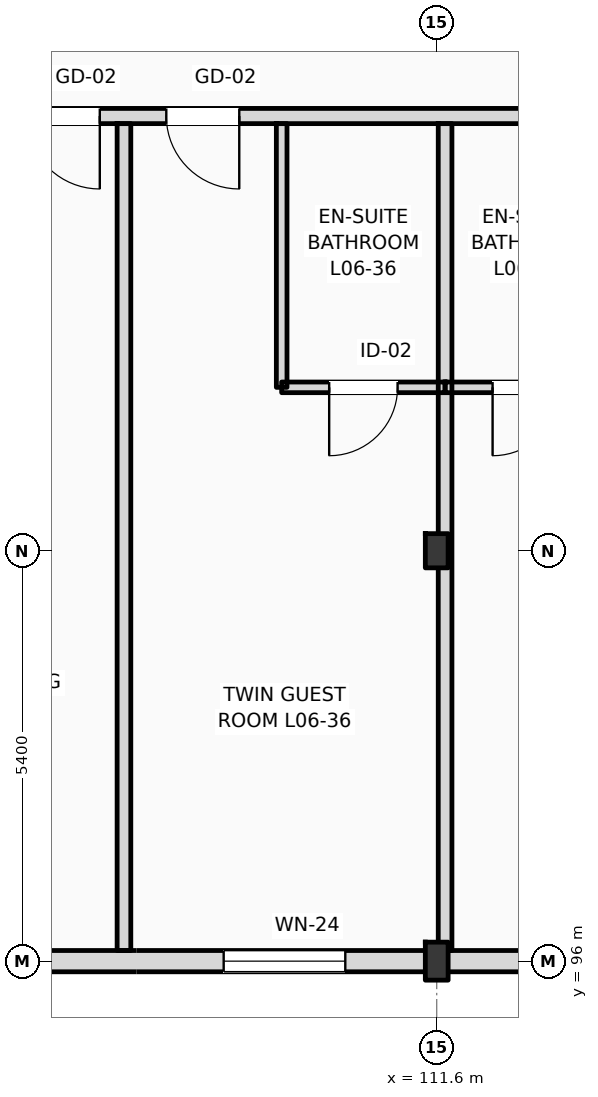
"""IFC4 building model, lengths in metres.
Left out: names, types, materials, properties, quantities, classifications, styles, units other than length and angle.
Written with IfcOpenShell. Run it as: python <this file> out.ifc"""

import sys

from ifc_helpers import new_model, si_unit, direction, frame, frame_2d, origin, origin_2d, place, context, subcontext, project, spatial, rectangle, i_section, extrude, element, fill, save


model = new_model("IFC4")
c1 = context("Model", 3, precision=1e-05, world=origin(), true_north=direction((0.0, 1.0)))
c2 = subcontext(c1, "Body", "Model", "MODEL_VIEW")
j1 = project(units=[si_unit("LENGTHUNIT", "METRE"), si_unit("PLANEANGLEUNIT", "RADIAN")], contexts=[c1])
p1 = place(None, origin())
s1 = spatial("IfcSite", under=j1, at=p1, CompositionType="ELEMENT")
p2 = place(p1, origin())
s2 = spatial("IfcBuilding", under=s1, at=p2, CompositionType="ELEMENT")
p3 = place(p2, frame((0.0, 0.0, 28.2)))
s3 = spatial("IfcBuildingStorey", under=s2, at=p3, CompositionType="ELEMENT", Elevation=28.2)
p4 = place(p3, frame((111.6, 96.0, 0.0), z_axis=(0.0, 0.0, 1.0), x_axis=(1.0, 0.0, 0.0)))
e1 = element("IfcColumn", 1, at=p4, inside=s3, PredefinedType="COLUMN", context=c2, shape_type="SweptSolid", body=[
    extrude(i_section(OverallWidth=0.3, OverallDepth=0.5, WebThickness=0.014, FlangeThickness=0.028, FilletRadius=0.027, at=origin_2d()), origin(), (0.0, 0.0, 1.0), 3.6),
])
p5 = place(p3, frame((111.6, 101.4, 0.0), z_axis=(0.0, 0.0, 1.0), x_axis=(1.0, 0.0, 0.0)))
e2 = element("IfcColumn", 2, at=p5, inside=s3, PredefinedType="COLUMN", context=c2, shape_type="SweptSolid", body=[
    extrude(i_section(OverallWidth=0.3, OverallDepth=0.45, WebThickness=0.014, FlangeThickness=0.026, FilletRadius=0.027, at=origin_2d()), origin(), (0.0, 0.0, 1.0), 3.6),
])
p6 = place(p3, frame((25.2, 96.0, 0.0), z_axis=(0.0, 0.0, 1.0), x_axis=(1.0, 0.0, 0.0)))
e3 = element("IfcWall", 3, at=p6, inside=s3, PredefinedType="STANDARD", context=c2, shape_type="SweptSolid", body=[
    extrude(rectangle(XDim=94.8, YDim=0.28, at=frame_2d((47.4, 0.0))), origin(), (0.0, 0.0, 1.0), 2.8),
])
p7 = place(p6, frame((16.454, 0.0, 0.9)))
e4 = element("IfcOpeningElement", 4, at=p7, cuts=e3, PredefinedType="OPENING", context=c2, shape_type="SweptSolid", body=[
    extrude(rectangle(XDim=2.7, YDim=1.72, at=frame_2d((1.35, 0.86))), frame((0.0, 0.15, 0.0), z_axis=(0.0, -1.0, 0.0), x_axis=(1.0, 0.0, 0.0)), (0.0, 0.0, 1.0), 0.3),
])
p8 = place(p6, frame((20.068, 0.0, 0.9)))
e5 = element("IfcOpeningElement", 5, at=p8, cuts=e3, PredefinedType="OPENING", context=c2, shape_type="SweptSolid", body=[
    extrude(rectangle(XDim=2.389, YDim=1.72, at=frame_2d((1.194, 0.86))), frame((0.0, 0.15, 0.0), z_axis=(0.0, -1.0, 0.0), x_axis=(1.0, 0.0, 0.0)), (0.0, 0.0, 1.0), 0.3),
])
p9 = place(p6, frame((24.277, 0.0, 0.9)))
e6 = element("IfcOpeningElement", 6, at=p9, cuts=e3, PredefinedType="OPENING", context=c2, shape_type="SweptSolid", body=[
    extrude(rectangle(XDim=1.8, YDim=1.72, at=frame_2d((0.9, 0.86))), frame((0.0, 0.15, 0.0), z_axis=(0.0, -1.0, 0.0), x_axis=(1.0, 0.0, 0.0)), (0.0, 0.0, 1.0), 0.3),
])
p10 = place(p6, frame((27.885, 0.0, 0.9)))
e7 = element("IfcOpeningElement", 7, at=p10, cuts=e3, PredefinedType="OPENING", context=c2, shape_type="SweptSolid", body=[
    extrude(rectangle(XDim=2.388, YDim=1.72, at=frame_2d((1.194, 0.86))), frame((0.0, 0.15, 0.0), z_axis=(0.0, -1.0, 0.0), x_axis=(1.0, 0.0, 0.0)), (0.0, 0.0, 1.0), 0.3),
])
p11 = place(p6, frame((32.093, 0.0, 0.9)))
e8 = element("IfcOpeningElement", 8, at=p11, cuts=e3, PredefinedType="OPENING", context=c2, shape_type="SweptSolid", body=[
    extrude(rectangle(XDim=1.8, YDim=1.72, at=frame_2d((0.9, 0.86))), frame((0.0, 0.15, 0.0), z_axis=(0.0, -1.0, 0.0), x_axis=(1.0, 0.0, 0.0)), (0.0, 0.0, 1.0), 0.3),
])
p12 = place(p6, frame((35.702, 0.0, 0.9)))
e9 = element("IfcOpeningElement", 9, at=p12, cuts=e3, PredefinedType="OPENING", context=c2, shape_type="SweptSolid", body=[
    extrude(rectangle(XDim=2.488, YDim=1.72, at=frame_2d((1.244, 0.86))), frame((0.0, 0.15, 0.0), z_axis=(0.0, -1.0, 0.0), x_axis=(1.0, 0.0, 0.0)), (0.0, 0.0, 1.0), 0.3),
])
p13 = place(p6, frame((55.56, 0.0, 0.9)))
e10 = element("IfcOpeningElement", 10, at=p13, cuts=e3, PredefinedType="OPENING", context=c2, shape_type="SweptSolid", body=[
    extrude(rectangle(XDim=1.8, YDim=1.72, at=frame_2d((0.9, 0.86))), frame((0.0, 0.15, 0.0), z_axis=(0.0, -1.0, 0.0), x_axis=(1.0, 0.0, 0.0)), (0.0, 0.0, 1.0), 0.3),
])
p14 = place(p6, frame((58.985, 0.0, 0.9)))
e11 = element("IfcOpeningElement", 11, at=p14, cuts=e3, PredefinedType="OPENING", context=c2, shape_type="SweptSolid", body=[
    extrude(rectangle(XDim=1.8, YDim=1.72, at=frame_2d((0.9, 0.86))), frame((0.0, 0.15, 0.0), z_axis=(0.0, -1.0, 0.0), x_axis=(1.0, 0.0, 0.0)), (0.0, 0.0, 1.0), 0.3),
])
p15 = place(p6, frame((63.21, 0.0, 0.9)))
e12 = element("IfcOpeningElement", 12, at=p15, cuts=e3, PredefinedType="OPENING", context=c2, shape_type="SweptSolid", body=[
    extrude(rectangle(XDim=2.525, YDim=1.72, at=frame_2d((1.262, 0.86))), frame((0.0, 0.15, 0.0), z_axis=(0.0, -1.0, 0.0), x_axis=(1.0, 0.0, 0.0)), (0.0, 0.0, 1.0), 0.3),
])
p16 = place(p6, frame((66.955, 0.0, 0.9)))
e13 = element("IfcOpeningElement", 13, at=p16, cuts=e3, PredefinedType="OPENING", context=c2, shape_type="SweptSolid", body=[
    extrude(rectangle(XDim=1.8, YDim=1.72, at=frame_2d((0.9, 0.86))), frame((0.0, 0.15, 0.0), z_axis=(0.0, -1.0, 0.0), x_axis=(1.0, 0.0, 0.0)), (0.0, 0.0, 1.0), 0.3),
])
p17 = place(p6, frame((71.892, 0.0, 0.9)))
e14 = element("IfcOpeningElement", 14, at=p17, cuts=e3, PredefinedType="OPENING", context=c2, shape_type="SweptSolid", body=[
    extrude(rectangle(XDim=1.1, YDim=1.5, at=frame_2d((0.55, 0.75))), frame((0.0, 0.15, 0.0), z_axis=(0.0, -1.0, 0.0), x_axis=(1.0, 0.0, 0.0)), (0.0, 0.0, 1.0), 0.3),
])
p18 = place(p6, frame((75.802, 0.0, 0.9)))
e15 = element("IfcOpeningElement", 15, at=p18, cuts=e3, PredefinedType="OPENING", context=c2, shape_type="SweptSolid", body=[
    extrude(rectangle(XDim=1.25, YDim=1.6, at=frame_2d((0.625, 0.8))), frame((0.0, 0.15, 0.0), z_axis=(0.0, -1.0, 0.0), x_axis=(1.0, 0.0, 0.0)), (0.0, 0.0, 1.0), 0.3),
])
p19 = place(p6, frame((79.712, 0.0, 0.9)))
e16 = element("IfcOpeningElement", 16, at=p19, cuts=e3, PredefinedType="OPENING", context=c2, shape_type="SweptSolid", body=[
    extrude(rectangle(XDim=1.4, YDim=1.7, at=frame_2d((0.7, 0.85))), frame((0.0, 0.15, 0.0), z_axis=(0.0, -1.0, 0.0), x_axis=(1.0, 0.0, 0.0)), (0.0, 0.0, 1.0), 0.3),
])
p20 = place(p6, frame((83.597, 0.0, 0.9)))
e17 = element("IfcOpeningElement", 17, at=p20, cuts=e3, PredefinedType="OPENING", context=c2, shape_type="SweptSolid", body=[
    extrude(rectangle(XDim=1.6, YDim=1.72, at=frame_2d((0.8, 0.86))), frame((0.0, 0.15, 0.0), z_axis=(0.0, -1.0, 0.0), x_axis=(1.0, 0.0, 0.0)), (0.0, 0.0, 1.0), 0.3),
])
p21 = place(p6, frame((87.507, 0.0, 0.9)))
e18 = element("IfcOpeningElement", 18, at=p21, cuts=e3, PredefinedType="OPENING", context=c2, shape_type="SweptSolid", body=[
    extrude(rectangle(XDim=1.75, YDim=1.72, at=frame_2d((0.875, 0.86))), frame((0.0, 0.15, 0.0), z_axis=(0.0, -1.0, 0.0), x_axis=(1.0, 0.0, 0.0)), (0.0, 0.0, 1.0), 0.3),
])
p22 = place(p6, frame((91.328, 0.0, 0.9)))
e19 = element("IfcOpeningElement", 19, at=p22, cuts=e3, PredefinedType="OPENING", context=c2, shape_type="SweptSolid", body=[
    extrude(rectangle(XDim=2.0, YDim=1.72, at=frame_2d((1.0, 0.86))), frame((0.0, 0.15, 0.0), z_axis=(0.0, -1.0, 0.0), x_axis=(1.0, 0.0, 0.0)), (0.0, 0.0, 1.0), 0.3),
])
p23 = place(p3, frame((79.76, 107.12, 0.0), z_axis=(0.0, 0.0, 1.0), x_axis=(1.0, 0.0, 0.0)))
e20 = element("IfcWall", 20, at=p23, inside=s3, PredefinedType="PARTITIONING", context=c2, shape_type="SweptSolid", body=[
    extrude(rectangle(XDim=40.1, YDim=0.2, at=frame_2d((20.05, 0.0))), origin(), (0.0, 0.0, 1.0), 3.36),
])
p24 = place(p23, frame((2.497, 0.0, 0.0)))
e21 = element("IfcOpeningElement", 21, at=p24, cuts=e20, PredefinedType="OPENING", context=c2, shape_type="SweptSolid", body=[
    extrude(rectangle(XDim=0.96, YDim=2.2, at=frame_2d((0.48, 1.1))), frame((0.0, 0.11, 0.0), z_axis=(0.0, -1.0, 0.0), x_axis=(1.0, 0.0, 0.0)), (0.0, 0.0, 1.0), 0.22),
])
p25 = place(p23, frame((4.372, 0.0, 0.0)))
e22 = element("IfcOpeningElement", 22, at=p25, cuts=e20, PredefinedType="OPENING", context=c2, shape_type="SweptSolid", body=[
    extrude(rectangle(XDim=0.96, YDim=2.2, at=frame_2d((0.48, 1.1))), frame((0.0, 0.11, 0.0), z_axis=(0.0, -1.0, 0.0), x_axis=(1.0, 0.0, 0.0)), (0.0, 0.0, 1.0), 0.22),
])
p26 = place(p23, frame((10.507, 0.0, 0.0)))
e23 = element("IfcOpeningElement", 23, at=p26, cuts=e20, PredefinedType="OPENING", context=c2, shape_type="SweptSolid", body=[
    extrude(rectangle(XDim=0.96, YDim=2.2, at=frame_2d((0.48, 1.1))), frame((0.0, 0.11, 0.0), z_axis=(0.0, -1.0, 0.0), x_axis=(1.0, 0.0, 0.0)), (0.0, 0.0, 1.0), 0.22),
])
p27 = place(p23, frame((12.342, 0.0, 0.0)))
e24 = element("IfcOpeningElement", 24, at=p27, cuts=e20, PredefinedType="OPENING", context=c2, shape_type="SweptSolid", body=[
    extrude(rectangle(XDim=0.96, YDim=2.2, at=frame_2d((0.48, 1.1))), frame((0.0, 0.11, 0.0), z_axis=(0.0, -1.0, 0.0), x_axis=(1.0, 0.0, 0.0)), (0.0, 0.0, 1.0), 0.22),
])
p28 = place(p23, frame((18.477, 0.0, 0.0)))
e25 = element("IfcOpeningElement", 25, at=p28, cuts=e20, PredefinedType="OPENING", context=c2, shape_type="SweptSolid", body=[
    extrude(rectangle(XDim=0.96, YDim=2.2, at=frame_2d((0.48, 1.1))), frame((0.0, 0.11, 0.0), z_axis=(0.0, -1.0, 0.0), x_axis=(1.0, 0.0, 0.0)), (0.0, 0.0, 1.0), 0.22),
])
p29 = place(p23, frame((20.312, 0.0, 0.0)))
e26 = element("IfcOpeningElement", 26, at=p29, cuts=e20, PredefinedType="OPENING", context=c2, shape_type="SweptSolid", body=[
    extrude(rectangle(XDim=0.96, YDim=2.2, at=frame_2d((0.48, 1.1))), frame((0.0, 0.11, 0.0), z_axis=(0.0, -1.0, 0.0), x_axis=(1.0, 0.0, 0.0)), (0.0, 0.0, 1.0), 0.22),
])
p30 = place(p23, frame((26.447, 0.0, 0.0)))
e27 = element("IfcOpeningElement", 27, at=p30, cuts=e20, PredefinedType="OPENING", context=c2, shape_type="SweptSolid", body=[
    extrude(rectangle(XDim=0.96, YDim=2.2, at=frame_2d((0.48, 1.1))), frame((0.0, 0.11, 0.0), z_axis=(0.0, -1.0, 0.0), x_axis=(1.0, 0.0, 0.0)), (0.0, 0.0, 1.0), 0.22),
])
p31 = place(p23, frame((28.282, 0.0, 0.0)))
e28 = element("IfcOpeningElement", 28, at=p31, cuts=e20, PredefinedType="OPENING", context=c2, shape_type="SweptSolid", body=[
    extrude(rectangle(XDim=0.96, YDim=2.2, at=frame_2d((0.48, 1.1))), frame((0.0, 0.11, 0.0), z_axis=(0.0, -1.0, 0.0), x_axis=(1.0, 0.0, 0.0)), (0.0, 0.0, 1.0), 0.22),
])
p32 = place(p23, frame((34.417, 0.0, 0.0)))
e29 = element("IfcOpeningElement", 29, at=p32, cuts=e20, PredefinedType="OPENING", context=c2, shape_type="SweptSolid", body=[
    extrude(rectangle(XDim=0.96, YDim=2.2, at=frame_2d((0.48, 1.1))), frame((0.0, 0.11, 0.0), z_axis=(0.0, -1.0, 0.0), x_axis=(1.0, 0.0, 0.0)), (0.0, 0.0, 1.0), 0.22),
])
p33 = place(p23, frame((36.212, 0.0, 0.0)))
e30 = element("IfcOpeningElement", 30, at=p33, cuts=e20, PredefinedType="OPENING", context=c2, shape_type="SweptSolid", body=[
    extrude(rectangle(XDim=0.96, YDim=2.2, at=frame_2d((0.48, 1.1))), frame((0.0, 0.11, 0.0), z_axis=(0.0, -1.0, 0.0), x_axis=(1.0, 0.0, 0.0)), (0.0, 0.0, 1.0), 0.22),
])
p34 = place(p3, frame((107.485, 96.14, 0.0), z_axis=(0.0, 0.0, 1.0), x_axis=(0.0, 1.0, 0.0)))
e31 = element("IfcWall", 31, at=p34, inside=s3, PredefinedType="PARTITIONING", context=c2, shape_type="SweptSolid", body=[
    extrude(rectangle(XDim=10.88, YDim=0.18, at=frame_2d((5.44, 0.0))), origin(), (0.0, 0.0, 1.0), 3.36),
])
p35 = place(p3, frame((111.71, 96.14, 0.0), z_axis=(0.0, 0.0, 1.0), x_axis=(0.0, 1.0, 0.0)))
e32 = element("IfcWall", 32, at=p35, inside=s3, PredefinedType="PARTITIONING", context=c2, shape_type="SweptSolid", body=[
    extrude(rectangle(XDim=10.88, YDim=0.18, at=frame_2d((5.44, 0.0))), origin(), (0.0, 0.0, 1.0), 2.99),
])
p36 = place(p3, frame((109.56, 103.55, 0.0), z_axis=(0.0, 0.0, 1.0), x_axis=(0.0, 1.0, 0.0)))
e33 = element("IfcWall", 33, at=p36, inside=s3, PredefinedType="PARTITIONING", context=c2, shape_type="SweptSolid", body=[
    extrude(rectangle(XDim=3.47, YDim=0.14, at=frame_2d((1.735, 0.0))), origin(), (0.0, 0.0, 1.0), 3.36),
])
p37 = place(p3, frame((109.56, 103.55, 0.0), z_axis=(0.0, 0.0, 1.0), x_axis=(1.0, 0.0, 0.0)))
e34 = element("IfcWall", 34, at=p37, inside=s3, PredefinedType="PARTITIONING", context=c2, shape_type="SweptSolid", body=[
    extrude(rectangle(XDim=2.15, YDim=0.14, at=frame_2d((1.075, 0.0))), origin(), (0.0, 0.0, 1.0), 3.36),
])
p38 = place(p37, frame((0.625, 0.0, 0.0)))
e35 = element("IfcOpeningElement", 35, at=p38, cuts=e34, PredefinedType="OPENING", context=c2, shape_type="SweptSolid", body=[
    extrude(rectangle(XDim=0.9, YDim=2.1, at=frame_2d((0.45, 1.05))), frame((0.0, 0.08, 0.0), z_axis=(0.0, -1.0, 0.0), x_axis=(1.0, 0.0, 0.0)), (0.0, 0.0, 1.0), 0.16),
])
p39 = place(p3, frame((111.71, 103.55, 0.0), z_axis=(0.0, 0.0, 1.0), x_axis=(1.0, 0.0, 0.0)))
e36 = element("IfcWall", 36, at=p39, inside=s3, PredefinedType="PARTITIONING", context=c2, shape_type="SweptSolid", body=[
    extrude(rectangle(XDim=2.15, YDim=0.14, at=frame_2d((1.075, 0.0))), origin(), (0.0, 0.0, 1.0), 3.36),
])
p40 = place(p39, frame((0.625, 0.0, 0.0)))
e37 = element("IfcOpeningElement", 37, at=p40, cuts=e36, PredefinedType="OPENING", context=c2, shape_type="SweptSolid", body=[
    extrude(rectangle(XDim=0.9, YDim=2.1, at=frame_2d((0.45, 1.05))), frame((0.0, 0.08, 0.0), z_axis=(0.0, -1.0, 0.0), x_axis=(1.0, 0.0, 0.0)), (0.0, 0.0, 1.0), 0.16),
])
p41 = place(p20, origin())
e38 = element("IfcWindow", 38, at=p41, inside=s3, PartitioningType="DOUBLE_PANEL_VERTICAL", PredefinedType="WINDOW", context=c2, shape_type="SweptSolid", body=[
    extrude(rectangle(XDim=1.6, YDim=1.72, at=frame_2d((0.8, 0.86))), frame((0.0, 0.03, 0.0), z_axis=(0.0, -1.0, 0.0), x_axis=(1.0, 0.0, 0.0)), (0.0, 0.0, 1.0), 0.06),
])
fill(e17, e38)
p42 = place(p30, frame((0.96, 0.0, 0.0), z_axis=(0.0, 0.0, 1.0), x_axis=(-1.0, 0.0, 0.0)))
e39 = element("IfcDoor", 39, at=p42, inside=s3, OperationType="SINGLE_SWING_RIGHT", PredefinedType="DOOR", context=c2, shape_type="SweptSolid", body=[
    extrude(rectangle(XDim=0.96, YDim=2.2, at=frame_2d((0.48, 1.1))), frame((0.0, 0.025, 0.0), z_axis=(0.0, -1.0, 0.0), x_axis=(1.0, 0.0, 0.0)), (0.0, 0.0, 1.0), 0.05),
])
fill(e27, e39)
p43 = place(p31, frame((0.96, 0.0, 0.0), z_axis=(0.0, 0.0, 1.0), x_axis=(-1.0, 0.0, 0.0)))
e40 = element("IfcDoor", 40, at=p43, inside=s3, OperationType="SINGLE_SWING_RIGHT", PredefinedType="DOOR", context=c2, shape_type="SweptSolid", body=[
    extrude(rectangle(XDim=0.96, YDim=2.2, at=frame_2d((0.48, 1.1))), frame((0.0, 0.025, 0.0), z_axis=(0.0, -1.0, 0.0), x_axis=(1.0, 0.0, 0.0)), (0.0, 0.0, 1.0), 0.05),
])
fill(e28, e40)
p44 = place(p38, frame((0.9, 0.0, 0.0), z_axis=(0.0, 0.0, 1.0), x_axis=(-1.0, 0.0, 0.0)))
e41 = element("IfcDoor", 41, at=p44, inside=s3, OperationType="SINGLE_SWING_LEFT", PredefinedType="DOOR", context=c2, shape_type="SweptSolid", body=[
    extrude(rectangle(XDim=0.9, YDim=2.1, at=frame_2d((0.45, 1.05))), frame((0.0, 0.025, 0.0), z_axis=(0.0, -1.0, 0.0), x_axis=(1.0, 0.0, 0.0)), (0.0, 0.0, 1.0), 0.05),
])
fill(e35, e41)
p45 = place(p40, frame((0.9, 0.0, 0.0), z_axis=(0.0, 0.0, 1.0), x_axis=(-1.0, 0.0, 0.0)))
e42 = element("IfcDoor", 42, at=p45, inside=s3, OperationType="SINGLE_SWING_LEFT", PredefinedType="DOOR", context=c2, shape_type="SweptSolid", body=[
    extrude(rectangle(XDim=0.9, YDim=2.1, at=frame_2d((0.45, 1.05))), frame((0.0, 0.025, 0.0), z_axis=(0.0, -1.0, 0.0), x_axis=(1.0, 0.0, 0.0)), (0.0, 0.0, 1.0), 0.05),
])
fill(e37, e42)
save(model, sys.argv[1])
